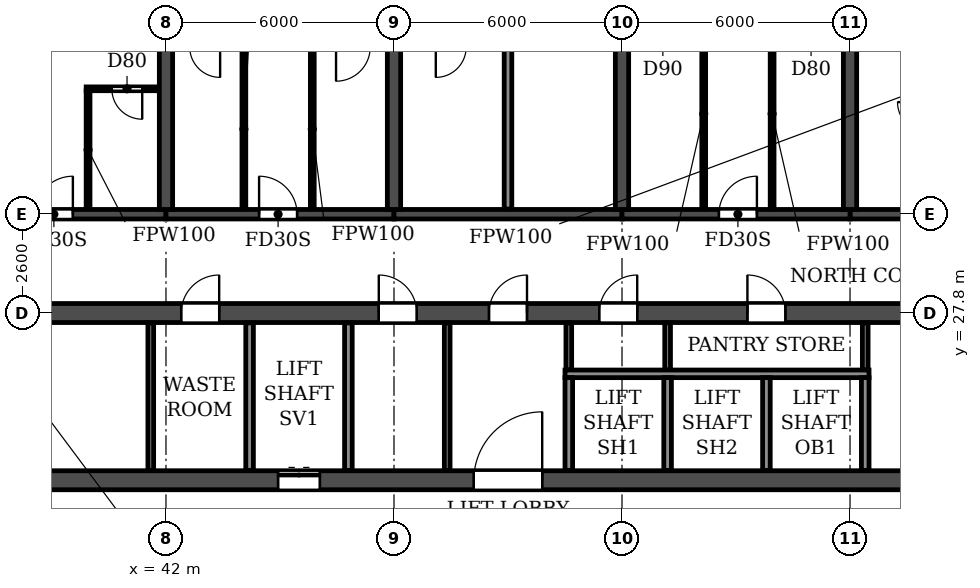
"""IFC4 building model, lengths in metres.
Left out: names, types, materials, properties, quantities, classifications, styles, units other than length and angle.
Written with IfcOpenShell. Run it as: python <this file> out.ifc"""

import sys

from ifc_helpers import new_model, si_unit, direction, frame, frame_2d, origin, place, context, subcontext, project, spatial, rectangle, extrude, element, fill, save


model = new_model("IFC4")
c1 = context("Model", 3, precision=1e-05, world=origin(), true_north=direction((0.0, 1.0)))
c2 = subcontext(c1, "Body", "Model", "MODEL_VIEW")
j1 = project(units=[si_unit("LENGTHUNIT", "METRE"), si_unit("PLANEANGLEUNIT", "RADIAN")], contexts=[c1])
p1 = place(None, origin())
s1 = spatial("IfcSite", under=j1, at=p1, CompositionType="ELEMENT")
p2 = place(p1, origin())
s2 = spatial("IfcBuilding", under=s1, at=p2, CompositionType="ELEMENT")
p3 = place(p2, frame((0.0, 0.0, 102.6)))
s3 = spatial("IfcBuildingStorey", under=s2, at=p3, CompositionType="ELEMENT", Elevation=102.6)
p4 = place(p3, frame((42.0, 30.525, 0.0), z_axis=(0.0, 0.0, 1.0), x_axis=(0.0, 1.0, 0.0)))
e1 = element("IfcWall", 1, at=p4, inside=s3, PredefinedType="SHEAR", context=c2, shape_type="SweptSolid", body=[
    extrude(rectangle(XDim=12.875, YDim=0.35, at=frame_2d((6.438, 0.0))), origin(), (0.0, 0.0, 1.0), 3.0),
])
p5 = place(p3, frame((48.0, 30.525, 0.0), z_axis=(0.0, 0.0, 1.0), x_axis=(0.0, 1.0, 0.0)))
e2 = element("IfcWall", 2, at=p5, inside=s3, PredefinedType="SHEAR", context=c2, shape_type="SweptSolid", body=[
    extrude(rectangle(XDim=12.875, YDim=0.35, at=frame_2d((6.438, 0.0))), origin(), (0.0, 0.0, 1.0), 3.0),
])
p6 = place(p5, frame((4.575, 0.0, 0.0)))
e3 = element("IfcOpeningElement", 3, at=p6, cuts=e2, PredefinedType="OPENING", context=c2, shape_type="SweptSolid", body=[
    extrude(rectangle(XDim=0.9, YDim=2.1, at=frame_2d((0.45, 1.05))), frame((0.0, 0.185, 0.0), z_axis=(0.0, -1.0, 0.0), x_axis=(1.0, 0.0, 0.0)), (0.0, 0.0, 1.0), 0.37),
])
p7 = place(p3, frame((54.0, 30.525, 0.0), z_axis=(0.0, 0.0, 1.0), x_axis=(0.0, 1.0, 0.0)))
e4 = element("IfcWall", 4, at=p7, inside=s3, PredefinedType="SHEAR", context=c2, shape_type="SweptSolid", body=[
    extrude(rectangle(XDim=12.875, YDim=0.35, at=frame_2d((6.438, 0.0))), origin(), (0.0, 0.0, 1.0), 3.0),
])
p8 = place(p7, frame((5.625, 0.0, 0.0)))
e5 = element("IfcOpeningElement", 5, at=p8, cuts=e4, PredefinedType="OPENING", context=c2, shape_type="SweptSolid", body=[
    extrude(rectangle(XDim=0.9, YDim=2.1, at=frame_2d((0.45, 1.05))), frame((0.0, 0.185, 0.0), z_axis=(0.0, -1.0, 0.0), x_axis=(1.0, 0.0, 0.0)), (0.0, 0.0, 1.0), 0.37),
])
p9 = place(p3, frame((60.0, 30.525, 0.0), z_axis=(0.0, 0.0, 1.0), x_axis=(0.0, 1.0, 0.0)))
e6 = element("IfcWall", 6, at=p9, inside=s3, PredefinedType="SHEAR", context=c2, shape_type="SweptSolid", body=[
    extrude(rectangle(XDim=12.875, YDim=0.35, at=frame_2d((6.438, 0.0))), origin(), (0.0, 0.0, 1.0), 3.0),
])
p10 = place(p3, frame((36.0, 30.4, 0.0), z_axis=(0.0, 0.0, 1.0), x_axis=(1.0, 0.0, 0.0)))
e7 = element("IfcWall", 7, at=p10, inside=s3, PredefinedType="SHEAR", context=c2, shape_type="SweptSolid", body=[
    extrude(rectangle(XDim=6.0, YDim=0.25, at=frame_2d((3.0, 0.0))), origin(), (0.0, 0.0, 1.0), 2.4),
])
p11 = place(p10, frame((2.55, 0.0, 0.0)))
e8 = element("IfcOpeningElement", 8, at=p11, cuts=e7, PredefinedType="OPENING", context=c2, shape_type="SweptSolid", body=[
    extrude(rectangle(XDim=1.0, YDim=2.1, at=frame_2d((0.5, 1.05))), frame((0.0, 0.135, 0.0), z_axis=(0.0, -1.0, 0.0), x_axis=(1.0, 0.0, 0.0)), (0.0, 0.0, 1.0), 0.27),
])
p12 = place(p3, frame((42.0, 30.4, 0.0), z_axis=(0.0, 0.0, 1.0), x_axis=(1.0, 0.0, 0.0)))
e9 = element("IfcWall", 9, at=p12, inside=s3, PredefinedType="SHEAR", context=c2, shape_type="SweptSolid", body=[
    extrude(rectangle(XDim=6.0, YDim=0.25, at=frame_2d((3.0, 0.0))), origin(), (0.0, 0.0, 1.0), 2.4),
])
p13 = place(p12, frame((2.45, 0.0, 0.0)))
e10 = element("IfcOpeningElement", 10, at=p13, cuts=e9, PredefinedType="OPENING", context=c2, shape_type="SweptSolid", body=[
    extrude(rectangle(XDim=1.0, YDim=2.1, at=frame_2d((0.5, 1.05))), frame((0.0, 0.135, 0.0), z_axis=(0.0, -1.0, 0.0), x_axis=(1.0, 0.0, 0.0)), (0.0, 0.0, 1.0), 0.27),
])
p14 = place(p3, frame((48.0, 30.4, 0.0), z_axis=(0.0, 0.0, 1.0), x_axis=(1.0, 0.0, 0.0)))
e11 = element("IfcWall", 11, at=p14, inside=s3, PredefinedType="SHEAR", context=c2, shape_type="SweptSolid", body=[
    extrude(rectangle(XDim=6.0, YDim=0.25, at=frame_2d((3.0, 0.0))), origin(), (0.0, 0.0, 1.0), 2.4),
])
p15 = place(p3, frame((54.0, 30.4, 0.0), z_axis=(0.0, 0.0, 1.0), x_axis=(1.0, 0.0, 0.0)))
e12 = element("IfcWall", 12, at=p15, inside=s3, PredefinedType="SHEAR", context=c2, shape_type="SweptSolid", body=[
    extrude(rectangle(XDim=6.0, YDim=0.25, at=frame_2d((3.0, 0.0))), origin(), (0.0, 0.0, 1.0), 2.4),
])
p16 = place(p15, frame((2.55, 0.0, 0.0)))
e13 = element("IfcOpeningElement", 13, at=p16, cuts=e12, PredefinedType="OPENING", context=c2, shape_type="SweptSolid", body=[
    extrude(rectangle(XDim=1.0, YDim=2.1, at=frame_2d((0.5, 1.05))), frame((0.0, 0.135, 0.0), z_axis=(0.0, -1.0, 0.0), x_axis=(1.0, 0.0, 0.0)), (0.0, 0.0, 1.0), 0.27),
])
p17 = place(p3, frame((60.0, 30.4, 0.0), z_axis=(0.0, 0.0, 1.0), x_axis=(1.0, 0.0, 0.0)))
e14 = element("IfcWall", 14, at=p17, inside=s3, PredefinedType="SHEAR", context=c2, shape_type="SweptSolid", body=[
    extrude(rectangle(XDim=6.0, YDim=0.25, at=frame_2d((3.0, 0.0))), origin(), (0.0, 0.0, 1.0), 2.4),
])
p18 = place(p17, frame((2.45, 0.0, 0.0)))
e15 = element("IfcOpeningElement", 15, at=p18, cuts=e14, PredefinedType="OPENING", context=c2, shape_type="SweptSolid", body=[
    extrude(rectangle(XDim=1.0, YDim=2.1, at=frame_2d((0.5, 1.05))), frame((0.0, 0.135, 0.0), z_axis=(0.0, -1.0, 0.0), x_axis=(1.0, 0.0, 0.0)), (0.0, 0.0, 1.0), 0.27),
])
p19 = place(p3, frame((8.6, 27.8, 0.0), z_axis=(0.0, 0.0, 1.0), x_axis=(1.0, 0.0, 0.0)))
e16 = element("IfcWall", 16, at=p19, inside=s3, PredefinedType="SOLIDWALL", context=c2, shape_type="SweptSolid", body=[
    extrude(rectangle(XDim=84.8, YDim=0.5, at=frame_2d((42.4, 0.0))), origin(), (0.0, 0.0, 1.0), 3.0),
])
p20 = place(p19, frame((1.35, 0.0, 0.0)))
e17 = element("IfcOpeningElement", 17, at=p20, cuts=e16, PredefinedType="OPENING", context=c2, shape_type="SweptSolid", body=[
    extrude(rectangle(XDim=1.0, YDim=2.1, at=frame_2d((0.5, 1.05))), frame((0.0, 0.26, 0.0), z_axis=(0.0, -1.0, 0.0), x_axis=(1.0, 0.0, 0.0)), (0.0, 0.0, 1.0), 0.52),
])
p21 = place(p19, frame((6.05, 0.0, 0.0)))
e18 = element("IfcOpeningElement", 18, at=p21, cuts=e16, PredefinedType="OPENING", context=c2, shape_type="SweptSolid", body=[
    extrude(rectangle(XDim=1.0, YDim=2.1, at=frame_2d((0.5, 1.05))), frame((0.0, 0.26, 0.0), z_axis=(0.0, -1.0, 0.0), x_axis=(1.0, 0.0, 0.0)), (0.0, 0.0, 1.0), 0.52),
])
p22 = place(p19, frame((10.3, 0.0, 0.0)))
e19 = element("IfcOpeningElement", 19, at=p22, cuts=e16, PredefinedType="OPENING", context=c2, shape_type="SweptSolid", body=[
    extrude(rectangle(XDim=1.0, YDim=2.1, at=frame_2d((0.5, 1.05))), frame((0.0, 0.26, 0.0), z_axis=(0.0, -1.0, 0.0), x_axis=(1.0, 0.0, 0.0)), (0.0, 0.0, 1.0), 0.52),
])
p23 = place(p19, frame((13.65, 0.0, 0.0)))
e20 = element("IfcOpeningElement", 20, at=p23, cuts=e16, PredefinedType="OPENING", context=c2, shape_type="SweptSolid", body=[
    extrude(rectangle(XDim=0.9, YDim=2.1, at=frame_2d((0.45, 1.05))), frame((0.0, 0.26, 0.0), z_axis=(0.0, -1.0, 0.0), x_axis=(1.0, 0.0, 0.0)), (0.0, 0.0, 1.0), 0.52),
])
p24 = place(p19, frame((22.85, 0.0, 0.0)))
e21 = element("IfcOpeningElement", 21, at=p24, cuts=e16, PredefinedType="OPENING", context=c2, shape_type="SweptSolid", body=[
    extrude(rectangle(XDim=0.9, YDim=2.1, at=frame_2d((0.45, 1.05))), frame((0.0, 0.26, 0.0), z_axis=(0.0, -1.0, 0.0), x_axis=(1.0, 0.0, 0.0)), (0.0, 0.0, 1.0), 0.52),
])
p25 = place(p19, frame((28.6, 0.0, 0.0)))
e22 = element("IfcOpeningElement", 22, at=p25, cuts=e16, PredefinedType="OPENING", context=c2, shape_type="SweptSolid", body=[
    extrude(rectangle(XDim=1.0, YDim=2.1, at=frame_2d((0.5, 1.05))), frame((0.0, 0.26, 0.0), z_axis=(0.0, -1.0, 0.0), x_axis=(1.0, 0.0, 0.0)), (0.0, 0.0, 1.0), 0.52),
])
p26 = place(p19, frame((33.8, 0.0, 0.0)))
e23 = element("IfcOpeningElement", 23, at=p26, cuts=e16, PredefinedType="OPENING", context=c2, shape_type="SweptSolid", body=[
    extrude(rectangle(XDim=1.0, YDim=2.1, at=frame_2d((0.5, 1.05))), frame((0.0, 0.26, 0.0), z_axis=(0.0, -1.0, 0.0), x_axis=(1.0, 0.0, 0.0)), (0.0, 0.0, 1.0), 0.52),
])
p27 = place(p19, frame((39.0, 0.0, 0.0)))
e24 = element("IfcOpeningElement", 24, at=p27, cuts=e16, PredefinedType="OPENING", context=c2, shape_type="SweptSolid", body=[
    extrude(rectangle(XDim=1.0, YDim=2.1, at=frame_2d((0.5, 1.05))), frame((0.0, 0.26, 0.0), z_axis=(0.0, -1.0, 0.0), x_axis=(1.0, 0.0, 0.0)), (0.0, 0.0, 1.0), 0.52),
])
p28 = place(p19, frame((41.9, 0.0, 0.0)))
e25 = element("IfcOpeningElement", 25, at=p28, cuts=e16, PredefinedType="OPENING", context=c2, shape_type="SweptSolid", body=[
    extrude(rectangle(XDim=1.0, YDim=2.1, at=frame_2d((0.5, 1.05))), frame((0.0, 0.26, 0.0), z_axis=(0.0, -1.0, 0.0), x_axis=(1.0, 0.0, 0.0)), (0.0, 0.0, 1.0), 0.52),
])
p29 = place(p19, frame((44.8, 0.0, 0.0)))
e26 = element("IfcOpeningElement", 26, at=p29, cuts=e16, PredefinedType="OPENING", context=c2, shape_type="SweptSolid", body=[
    extrude(rectangle(XDim=1.0, YDim=2.1, at=frame_2d((0.5, 1.05))), frame((0.0, 0.26, 0.0), z_axis=(0.0, -1.0, 0.0), x_axis=(1.0, 0.0, 0.0)), (0.0, 0.0, 1.0), 0.52),
])
p30 = place(p19, frame((48.7, 0.0, 0.0)))
e27 = element("IfcOpeningElement", 27, at=p30, cuts=e16, PredefinedType="OPENING", context=c2, shape_type="SweptSolid", body=[
    extrude(rectangle(XDim=1.0, YDim=2.1, at=frame_2d((0.5, 1.05))), frame((0.0, 0.26, 0.0), z_axis=(0.0, -1.0, 0.0), x_axis=(1.0, 0.0, 0.0)), (0.0, 0.0, 1.0), 0.52),
])
p31 = place(p19, frame((55.2, 0.0, 0.0)))
e28 = element("IfcOpeningElement", 28, at=p31, cuts=e16, PredefinedType="OPENING", context=c2, shape_type="SweptSolid", body=[
    extrude(rectangle(XDim=1.0, YDim=2.1, at=frame_2d((0.5, 1.05))), frame((0.0, 0.26, 0.0), z_axis=(0.0, -1.0, 0.0), x_axis=(1.0, 0.0, 0.0)), (0.0, 0.0, 1.0), 0.52),
])
p32 = place(p19, frame((61.05, 0.0, 0.0)))
e29 = element("IfcOpeningElement", 29, at=p32, cuts=e16, PredefinedType="OPENING", context=c2, shape_type="SweptSolid", body=[
    extrude(rectangle(XDim=0.9, YDim=2.1, at=frame_2d((0.45, 1.05))), frame((0.0, 0.26, 0.0), z_axis=(0.0, -1.0, 0.0), x_axis=(1.0, 0.0, 0.0)), (0.0, 0.0, 1.0), 0.52),
])
p33 = place(p19, frame((70.25, 0.0, 0.0)))
e30 = element("IfcOpeningElement", 30, at=p33, cuts=e16, PredefinedType="OPENING", context=c2, shape_type="SweptSolid", body=[
    extrude(rectangle(XDim=0.9, YDim=2.1, at=frame_2d((0.45, 1.05))), frame((0.0, 0.26, 0.0), z_axis=(0.0, -1.0, 0.0), x_axis=(1.0, 0.0, 0.0)), (0.0, 0.0, 1.0), 0.52),
])
p34 = place(p19, frame((73.5, 0.0, 0.0)))
e31 = element("IfcOpeningElement", 31, at=p34, cuts=e16, PredefinedType="OPENING", context=c2, shape_type="SweptSolid", body=[
    extrude(rectangle(XDim=1.0, YDim=2.1, at=frame_2d((0.5, 1.05))), frame((0.0, 0.26, 0.0), z_axis=(0.0, -1.0, 0.0), x_axis=(1.0, 0.0, 0.0)), (0.0, 0.0, 1.0), 0.52),
])
p35 = place(p19, frame((77.95, 0.0, 0.0)))
e32 = element("IfcOpeningElement", 32, at=p35, cuts=e16, PredefinedType="OPENING", context=c2, shape_type="SweptSolid", body=[
    extrude(rectangle(XDim=1.5, YDim=2.1, at=frame_2d((0.75, 1.05))), frame((0.0, 0.26, 0.0), z_axis=(0.0, -1.0, 0.0), x_axis=(1.0, 0.0, 0.0)), (0.0, 0.0, 1.0), 0.52),
])
p36 = place(p19, frame((82.9, 0.0, 0.0)))
e33 = element("IfcOpeningElement", 33, at=p36, cuts=e16, PredefinedType="OPENING", context=c2, shape_type="SweptSolid", body=[
    extrude(rectangle(XDim=1.0, YDim=2.1, at=frame_2d((0.5, 1.05))), frame((0.0, 0.26, 0.0), z_axis=(0.0, -1.0, 0.0), x_axis=(1.0, 0.0, 0.0)), (0.0, 0.0, 1.0), 0.52),
])
p37 = place(p3, frame((33.925, 23.4, 0.0), z_axis=(0.0, 0.0, 1.0), x_axis=(1.0, 0.0, 0.0)))
e34 = element("IfcWall", 34, at=p37, inside=s3, PredefinedType="SOLIDWALL", context=c2, shape_type="SweptSolid", body=[
    extrude(rectangle(XDim=34.15, YDim=0.5, at=frame_2d((17.075, 0.0))), origin(), (0.0, 0.0, 1.0), 3.0),
])
p38 = place(p37, frame((16.175, 0.0, 0.0)))
e35 = element("IfcOpeningElement", 35, at=p38, cuts=e34, PredefinedType="OPENING", context=c2, shape_type="SweptSolid", body=[
    extrude(rectangle(XDim=1.8, YDim=2.1, at=frame_2d((0.9, 1.05))), frame((0.0, 0.26, 0.0), z_axis=(0.0, -1.0, 0.0), x_axis=(1.0, 0.0, 0.0)), (0.0, 0.0, 1.0), 0.52),
])
p39 = place(p37, frame((11.025, 0.0, 0.0)))
e36 = element("IfcOpeningElement", 36, at=p39, cuts=e34, PredefinedType="OPENING", context=c2, shape_type="SweptSolid", body=[
    extrude(rectangle(XDim=1.1, YDim=2.1, at=frame_2d((0.55, 1.05))), frame((0.0, 0.26, 0.0), z_axis=(0.0, -1.0, 0.0), x_axis=(1.0, 0.0, 0.0)), (0.0, 0.0, 1.0), 0.52),
])
p40 = place(p3, frame((49.4, 23.66, 0.0), z_axis=(0.0, 0.0, 1.0), x_axis=(0.0, 1.0, 0.0)))
e37 = element("IfcWall", 37, at=p40, inside=s3, PredefinedType="PARTITIONING", context=c2, shape_type="SweptSolid", body=[
    extrude(rectangle(XDim=3.88, YDim=0.15, at=frame_2d((1.94, 0.0))), origin(), (0.0, 0.0, 1.0), 3.0),
])
p41 = place(p3, frame((52.6, 26.3, 0.0), z_axis=(0.0, 0.0, 1.0), x_axis=(0.0, 1.0, 0.0)))
e38 = element("IfcWall", 38, at=p41, inside=s3, PredefinedType="PARTITIONING", context=c2, shape_type="SweptSolid", body=[
    extrude(rectangle(XDim=1.24, YDim=0.15, at=frame_2d((0.62, 0.0))), origin(), (0.0, 0.0, 1.0), 3.0),
])
p42 = place(p3, frame((51.0, 30.535, 0.0), z_axis=(0.0, 0.0, 1.0), x_axis=(0.0, 1.0, 0.0)))
e39 = element("IfcWall", 39, at=p42, inside=s3, PredefinedType="PARTITIONING", context=c2, shape_type="SweptSolid", body=[
    extrude(rectangle(XDim=13.005, YDim=0.2, at=frame_2d((6.502, 0.0))), origin(), (0.0, 0.0, 1.0), 3.0),
])
p43 = place(p3, frame((39.9, 33.7, 0.0), z_axis=(0.0, 0.0, 1.0), x_axis=(1.0, 0.0, 0.0)))
e40 = element("IfcWall", 40, at=p43, inside=s3, PredefinedType="PARTITIONING", context=c2, shape_type="SweptSolid", body=[
    extrude(rectangle(XDim=1.915, YDim=0.1, at=frame_2d((0.958, 0.0))), origin(), (0.0, 0.0, 1.0), 3.0),
])
p44 = place(p43, frame((0.675, 0.0, 0.0)))
e41 = element("IfcOpeningElement", 41, at=p44, cuts=e40, PredefinedType="OPENING", context=c2, shape_type="SweptSolid", body=[
    extrude(rectangle(XDim=0.8, YDim=2.1, at=frame_2d((0.4, 1.05))), frame((0.0, 0.06, 0.0), z_axis=(0.0, -1.0, 0.0), x_axis=(1.0, 0.0, 0.0)), (0.0, 0.0, 1.0), 0.12),
])
p45 = place(p3, frame((39.95, 30.535, 0.0), z_axis=(0.0, 0.0, 1.0), x_axis=(0.0, 1.0, 0.0)))
e42 = element("IfcWall", 42, at=p45, inside=s3, PredefinedType="PARTITIONING", context=c2, shape_type="SweptSolid", body=[
    extrude(rectangle(XDim=3.115, YDim=0.1, at=frame_2d((1.558, 0.0))), origin(), (0.0, 0.0, 1.0), 3.0),
])
for number, where, z_axis, x_axis in (
    (43, (44.05, 30.535, 0.0), (0.0, 0.0, 1.0), (0.0, 1.0, 0.0)),
    (44, (45.85, 30.535, 0.0), (0.0, 0.0, 1.0), (0.0, 1.0, 0.0)),
):
    element("IfcWall", number, at=place(p3, frame(where, z_axis=z_axis, x_axis=x_axis)), inside=s3, PredefinedType="PARTITIONING", context=c2, shape_type="SweptSolid", body=[
        extrude(rectangle(XDim=4.215, YDim=0.1, at=frame_2d((2.107, 0.0))), origin(), (0.0, 0.0, 1.0), 3.0),
    ])
for number, where, z_axis, x_axis in (
    (45, (56.15, 30.535, 0.0), (0.0, 0.0, 1.0), (0.0, 1.0, 0.0)),
    (46, (57.95, 30.535, 0.0), (0.0, 0.0, 1.0), (0.0, 1.0, 0.0)),
):
    element("IfcWall", number, at=place(p3, frame(where, z_axis=z_axis, x_axis=x_axis)), inside=s3, PredefinedType="PARTITIONING", context=c2, shape_type="SweptSolid", body=[
        extrude(rectangle(XDim=5.015, YDim=0.1, at=frame_2d((2.508, 0.0))), origin(), (0.0, 0.0, 1.0), 3.0),
    ])
p46 = place(p3, frame((41.6, 23.66, 0.0), z_axis=(0.0, 0.0, 1.0), x_axis=(0.0, 1.0, 0.0)))
e47 = element("IfcWall", 47, at=p46, inside=s3, PredefinedType="PARTITIONING", context=c2, shape_type="SweptSolid", body=[
    extrude(rectangle(XDim=3.88, YDim=0.15, at=frame_2d((1.94, 0.0))), origin(), (0.0, 0.0, 1.0), 3.0),
])
for number, where, z_axis, x_axis in (
    (48, (55.2, 26.3, 0.0), (0.0, 0.0, 1.0), (0.0, 1.0, 0.0)),
    (49, (60.4, 26.3, 0.0), (0.0, 0.0, 1.0), (0.0, 1.0, 0.0)),
):
    element("IfcWall", number, at=place(p3, frame(where, z_axis=z_axis, x_axis=x_axis)), inside=s3, PredefinedType="PARTITIONING", context=c2, shape_type="SweptSolid", body=[
        extrude(rectangle(XDim=1.24, YDim=0.15, at=frame_2d((0.62, 0.0))), origin(), (0.0, 0.0, 1.0), 3.0),
    ])
p47 = place(p3, frame((52.5, 26.2, 0.0), z_axis=(0.0, 0.0, 1.0), x_axis=(1.0, 0.0, 0.0)))
e50 = element("IfcWall", 50, at=p47, inside=s3, PredefinedType="PARTITIONING", context=c2, shape_type="SweptSolid", body=[
    extrude(rectangle(XDim=8.0, YDim=0.2, at=frame_2d((4.0, 0.0))), origin(), (0.0, 0.0, 1.0), 3.0),
])
for number, where, z_axis, x_axis in (
    (51, (44.2, 23.66, 0.0), (0.0, 0.0, 1.0), (0.0, 1.0, 0.0)),
    (52, (46.8, 23.66, 0.0), (0.0, 0.0, 1.0), (0.0, 1.0, 0.0)),
):
    element("IfcWall", number, at=place(p3, frame(where, z_axis=z_axis, x_axis=x_axis)), inside=s3, PredefinedType="PARTITIONING", context=c2, shape_type="SweptSolid", body=[
        extrude(rectangle(XDim=3.88, YDim=0.2, at=frame_2d((1.94, 0.0))), origin(), (0.0, 0.0, 1.0), 3.0),
    ])
for number, where, z_axis, x_axis in (
    (53, (52.6, 23.66, 0.0), (0.0, 0.0, 1.0), (0.0, 1.0, 0.0)),
    (54, (55.2, 23.66, 0.0), (0.0, 0.0, 1.0), (0.0, 1.0, 0.0)),
    (55, (57.8, 23.66, 0.0), (0.0, 0.0, 1.0), (0.0, 1.0, 0.0)),
    (56, (60.4, 23.66, 0.0), (0.0, 0.0, 1.0), (0.0, 1.0, 0.0)),
):
    element("IfcWall", number, at=place(p3, frame(where, z_axis=z_axis, x_axis=x_axis)), inside=s3, PredefinedType="PARTITIONING", context=c2, shape_type="SweptSolid", body=[
        extrude(rectangle(XDim=2.44, YDim=0.2, at=frame_2d((1.22, 0.0))), origin(), (0.0, 0.0, 1.0), 3.0),
    ])
p48 = place(p26, origin())
e57 = element("IfcDoor", 57, at=p48, inside=s3, OperationType="SINGLE_SWING_RIGHT", PredefinedType="DOOR", context=c2, shape_type="SweptSolid", body=[
    extrude(rectangle(XDim=1.0, YDim=2.1, at=frame_2d((0.5, 1.05))), frame((0.0, 0.025, 0.0), z_axis=(0.0, -1.0, 0.0), x_axis=(1.0, 0.0, 0.0)), (0.0, 0.0, 1.0), 0.05),
])
fill(e23, e57)
p49 = place(p27, origin())
e58 = element("IfcDoor", 58, at=p49, inside=s3, OperationType="SINGLE_SWING_LEFT", PredefinedType="DOOR", context=c2, shape_type="SweptSolid", body=[
    extrude(rectangle(XDim=1.0, YDim=2.1, at=frame_2d((0.5, 1.05))), frame((0.0, 0.025, 0.0), z_axis=(0.0, -1.0, 0.0), x_axis=(1.0, 0.0, 0.0)), (0.0, 0.0, 1.0), 0.05),
])
fill(e24, e58)
p50 = place(p28, origin())
e59 = element("IfcDoor", 59, at=p50, inside=s3, OperationType="SINGLE_SWING_RIGHT", PredefinedType="DOOR", context=c2, shape_type="SweptSolid", body=[
    extrude(rectangle(XDim=1.0, YDim=2.1, at=frame_2d((0.5, 1.05))), frame((0.0, 0.025, 0.0), z_axis=(0.0, -1.0, 0.0), x_axis=(1.0, 0.0, 0.0)), (0.0, 0.0, 1.0), 0.05),
])
fill(e25, e59)
p51 = place(p29, origin())
e60 = element("IfcDoor", 60, at=p51, inside=s3, OperationType="SINGLE_SWING_RIGHT", PredefinedType="DOOR", context=c2, shape_type="SweptSolid", body=[
    extrude(rectangle(XDim=1.0, YDim=2.1, at=frame_2d((0.5, 1.05))), frame((0.0, 0.025, 0.0), z_axis=(0.0, -1.0, 0.0), x_axis=(1.0, 0.0, 0.0)), (0.0, 0.0, 1.0), 0.05),
])
fill(e26, e60)
p52 = place(p30, origin())
e61 = element("IfcDoor", 61, at=p52, inside=s3, OperationType="SINGLE_SWING_LEFT", PredefinedType="DOOR", context=c2, shape_type="SweptSolid", body=[
    extrude(rectangle(XDim=1.0, YDim=2.1, at=frame_2d((0.5, 1.05))), frame((0.0, 0.025, 0.0), z_axis=(0.0, -1.0, 0.0), x_axis=(1.0, 0.0, 0.0)), (0.0, 0.0, 1.0), 0.05),
])
fill(e27, e61)
p53 = place(p11, origin())
e62 = element("IfcDoor", 62, at=p53, inside=s3, OperationType="SINGLE_SWING_RIGHT", PredefinedType="DOOR", context=c2, shape_type="SweptSolid", body=[
    extrude(rectangle(XDim=1.0, YDim=2.1, at=frame_2d((0.5, 1.05))), frame((0.0, 0.025, 0.0), z_axis=(0.0, -1.0, 0.0), x_axis=(1.0, 0.0, 0.0)), (0.0, 0.0, 1.0), 0.05),
])
fill(e8, e62)
p54 = place(p44, frame((0.8, 0.0, 0.0), z_axis=(0.0, 0.0, 1.0), x_axis=(-1.0, 0.0, 0.0)))
e63 = element("IfcDoor", 63, at=p54, inside=s3, OperationType="SINGLE_SWING_LEFT", PredefinedType="DOOR", context=c2, shape_type="SweptSolid", body=[
    extrude(rectangle(XDim=0.8, YDim=2.1, at=frame_2d((0.4, 1.05))), frame((0.0, 0.025, 0.0), z_axis=(0.0, -1.0, 0.0), x_axis=(1.0, 0.0, 0.0)), (0.0, 0.0, 1.0), 0.05),
])
fill(e41, e63)
p55 = place(p13, origin())
e64 = element("IfcDoor", 64, at=p55, inside=s3, OperationType="SINGLE_SWING_LEFT", PredefinedType="DOOR", context=c2, shape_type="SweptSolid", body=[
    extrude(rectangle(XDim=1.0, YDim=2.1, at=frame_2d((0.5, 1.05))), frame((0.0, 0.025, 0.0), z_axis=(0.0, -1.0, 0.0), x_axis=(1.0, 0.0, 0.0)), (0.0, 0.0, 1.0), 0.05),
])
fill(e10, e64)
p56 = place(p16, origin())
e65 = element("IfcDoor", 65, at=p56, inside=s3, OperationType="SINGLE_SWING_RIGHT", PredefinedType="DOOR", context=c2, shape_type="SweptSolid", body=[
    extrude(rectangle(XDim=1.0, YDim=2.1, at=frame_2d((0.5, 1.05))), frame((0.0, 0.025, 0.0), z_axis=(0.0, -1.0, 0.0), x_axis=(1.0, 0.0, 0.0)), (0.0, 0.0, 1.0), 0.05),
])
fill(e13, e65)
p57 = place(p38, origin())
e66 = element("IfcDoor", 66, at=p57, inside=s3, OperationType="DOUBLE_DOOR_SINGLE_SWING", PredefinedType="DOOR", context=c2, shape_type="SweptSolid", body=[
    extrude(rectangle(XDim=1.8, YDim=2.1, at=frame_2d((0.9, 1.05))), frame((0.0, 0.025, 0.0), z_axis=(0.0, -1.0, 0.0), x_axis=(1.0, 0.0, 0.0)), (0.0, 0.0, 1.0), 0.05),
])
fill(e35, e66)
p58 = place(p39, origin())
e67 = element("IfcDoor", 67, at=p58, inside=s3, OperationType="DOUBLE_DOOR_SLIDING", PredefinedType="DOOR", context=c2, shape_type="SweptSolid", body=[
    extrude(rectangle(XDim=1.1, YDim=2.1, at=frame_2d((0.55, 1.05))), frame((0.0, 0.025, 0.0), z_axis=(0.0, -1.0, 0.0), x_axis=(1.0, 0.0, 0.0)), (0.0, 0.0, 1.0), 0.05),
])
fill(e36, e67)
save(model, sys.argv[1])
